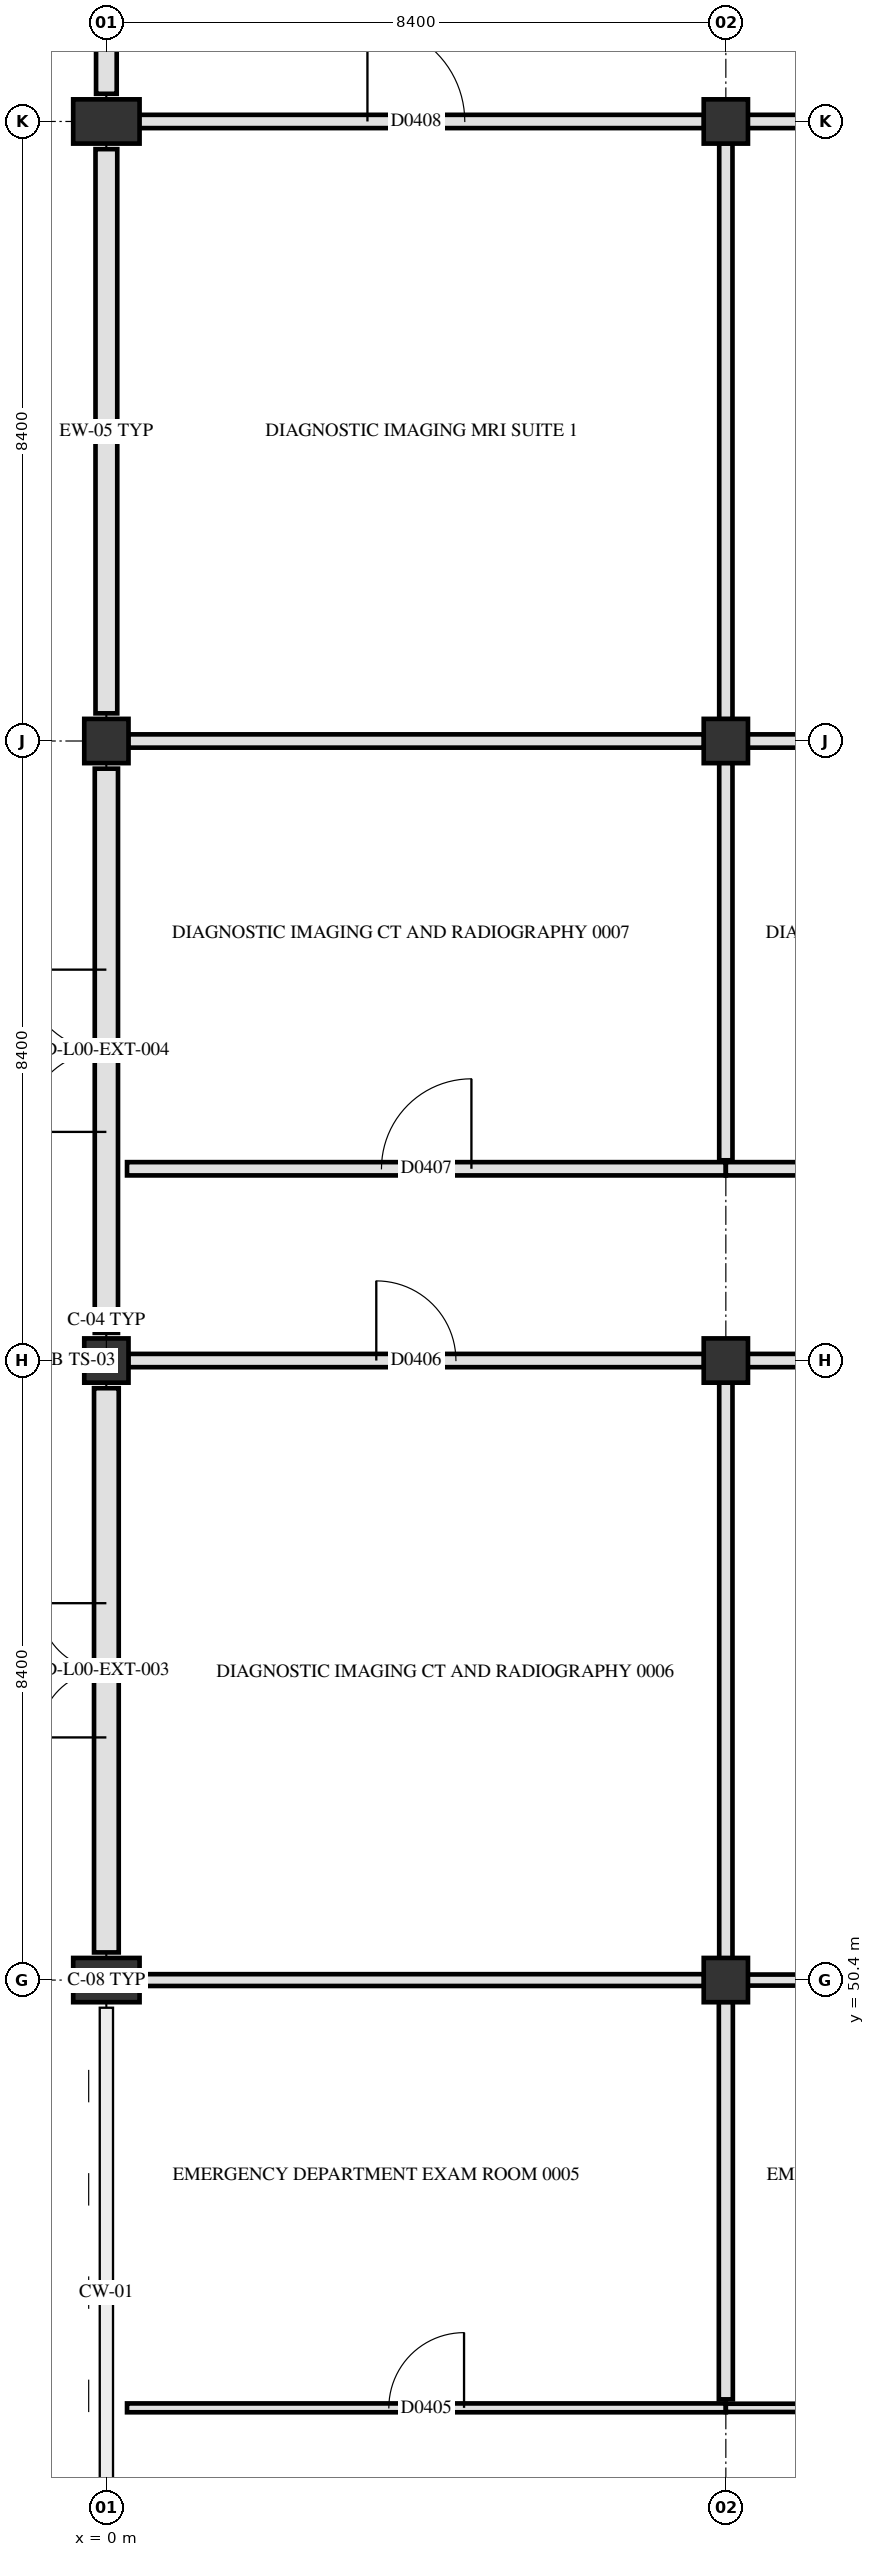
"""IFC4 building model, lengths in metres.
Left out: names, types, materials, properties, quantities, classifications, styles, units other than length and angle.
Written with IfcOpenShell. Run it as: python <this file> out.ifc"""

import sys

from ifc_helpers import new_model, si_unit, direction, frame, frame_2d, origin, origin_2d, place, context, subcontext, project, spatial, rectangle, extrude, element, fill, save


model = new_model("IFC4")
c1 = context("Model", 3, precision=1e-05, world=origin(), true_north=direction((0.0, 1.0)))
c2 = subcontext(c1, "Body", "Model", "MODEL_VIEW")
j1 = project(units=[si_unit("LENGTHUNIT", "METRE"), si_unit("PLANEANGLEUNIT", "RADIAN")], contexts=[c1])
p1 = place(None, origin())
s1 = spatial("IfcSite", under=j1, at=p1, CompositionType="ELEMENT")
p2 = place(p1, origin())
s2 = spatial("IfcBuilding", under=s1, at=p2, CompositionType="ELEMENT")
p3 = place(p2, origin())
s3 = spatial("IfcBuildingStorey", under=s2, at=p3, CompositionType="ELEMENT", Elevation=0.0)
p4 = place(p3, frame((0.0, 50.4, 0.0), z_axis=(0.0, 0.0, 1.0), x_axis=(0.0, 1.0, 0.0)))
e1 = element("IfcColumn", 1, at=p4, inside=s3, PredefinedType="PILASTER", context=c2, shape_type="SweptSolid", body=[
    extrude(rectangle(XDim=0.6, YDim=0.9, at=origin_2d()), origin(), (0.0, 0.0, 1.0), 4.8),
])
for number, where, z_axis, x_axis in (
    (2, (0.0, 58.8, 0.0), (0.0, 0.0, 1.0), (1.0, 0.0, 0.0)),
    (3, (0.0, 67.2, 0.0), (0.0, 0.0, 1.0), (1.0, 0.0, 0.0)),
):
    element("IfcColumn", number, at=place(p3, frame(where, z_axis=z_axis, x_axis=x_axis)), inside=s3, PredefinedType="COLUMN", context=c2, shape_type="SweptSolid", body=[
        extrude(rectangle(XDim=0.6, YDim=0.6, at=origin_2d()), origin(), (0.0, 0.0, 1.0), 4.8),
    ])
p5 = place(p3, frame((0.0, 75.6, 0.0), z_axis=(0.0, 0.0, 1.0), x_axis=(0.0, 1.0, 0.0)))
e4 = element("IfcColumn", 4, at=p5, inside=s3, PredefinedType="PILASTER", context=c2, shape_type="SweptSolid", body=[
    extrude(rectangle(XDim=0.6, YDim=0.9, at=origin_2d()), origin(), (0.0, 0.0, 1.0), 4.8),
])
for number, where, z_axis, x_axis in (
    (5, (8.4, 50.4, 0.0), (0.0, 0.0, 1.0), (1.0, 0.0, 0.0)),
    (6, (8.4, 58.8, 0.0), (0.0, 0.0, 1.0), (1.0, 0.0, 0.0)),
    (7, (8.4, 67.2, 0.0), (0.0, 0.0, 1.0), (1.0, 0.0, 0.0)),
    (8, (8.4, 75.6, 0.0), (0.0, 0.0, 1.0), (1.0, 0.0, 0.0)),
):
    element("IfcColumn", number, at=place(p3, frame(where, z_axis=z_axis, x_axis=x_axis)), inside=s3, PredefinedType="COLUMN", context=c2, shape_type="SweptSolid", body=[
        extrude(rectangle(XDim=0.6, YDim=0.6, at=origin_2d()), origin(), (0.0, 0.0, 1.0), 4.8),
    ])
p6 = place(p3, frame((0.0, 50.775, 0.0), z_axis=(0.0, 0.0, 1.0), x_axis=(0.0, 1.0, 0.0)))
e9 = element("IfcWall", 9, at=p6, inside=s3, PredefinedType="SOLIDWALL", context=c2, shape_type="SweptSolid", body=[
    extrude(rectangle(XDim=7.65, YDim=0.335, at=frame_2d((3.825, 0.0))), origin(), (0.0, 0.0, 1.0), 3.79),
])
p7 = place(p6, frame((2.915, 0.0, 0.0)))
e10 = element("IfcOpeningElement", 10, at=p7, cuts=e9, PredefinedType="OPENING", context=c2, shape_type="SweptSolid", body=[
    extrude(rectangle(XDim=1.82, YDim=2.28, at=frame_2d((0.91, 1.14))), frame((0.0, 0.177, 0.0), z_axis=(0.0, -1.0, 0.0), x_axis=(1.0, 0.0, 0.0)), (0.0, 0.0, 1.0), 0.355),
])
p8 = place(p3, frame((0.0, 59.175, 0.0), z_axis=(0.0, 0.0, 1.0), x_axis=(0.0, 1.0, 0.0)))
e11 = element("IfcWall", 11, at=p8, inside=s3, PredefinedType="SOLIDWALL", context=c2, shape_type="SweptSolid", body=[
    extrude(rectangle(XDim=7.65, YDim=0.315, at=frame_2d((3.825, 0.0))), origin(), (0.0, 0.0, 1.0), 3.79),
])
p9 = place(p8, frame((2.725, 0.0, 0.0)))
e12 = element("IfcOpeningElement", 12, at=p9, cuts=e11, PredefinedType="OPENING", context=c2, shape_type="SweptSolid", body=[
    extrude(rectangle(XDim=2.2, YDim=2.35, at=frame_2d((1.1, 1.175))), frame((0.0, 0.167, 0.0), z_axis=(0.0, -1.0, 0.0), x_axis=(1.0, 0.0, 0.0)), (0.0, 0.0, 1.0), 0.335),
])
p10 = place(p3, frame((0.0, 67.575, 0.0), z_axis=(0.0, 0.0, 1.0), x_axis=(0.0, 1.0, 0.0)))
e13 = element("IfcWall", 13, at=p10, inside=s3, PredefinedType="SOLIDWALL", context=c2, shape_type="SweptSolid", body=[
    extrude(rectangle(XDim=7.65, YDim=0.295, at=frame_2d((3.825, 0.0))), origin(), (0.0, 0.0, 1.0), 3.79),
])
p11 = place(p3, frame((0.0, 75.975, 0.0), z_axis=(0.0, 0.0, 1.0), x_axis=(0.0, 1.0, 0.0)))
e14 = element("IfcWall", 14, at=p11, inside=s3, PredefinedType="SOLIDWALL", context=c2, shape_type="SweptSolid", body=[
    extrude(rectangle(XDim=7.65, YDim=0.28, at=frame_2d((3.825, 0.0))), origin(), (0.0, 0.0, 1.0), 3.79),
])
p12 = place(p11, frame((1.438, 0.0, 0.85)))
e15 = element("IfcOpeningElement", 15, at=p12, cuts=e14, PredefinedType="OPENING", context=c2, shape_type="SweptSolid", body=[
    extrude(rectangle(XDim=0.95, YDim=1.3, at=frame_2d((0.475, 0.65))), frame((0.0, 0.15, 0.0), z_axis=(0.0, -1.0, 0.0), x_axis=(1.0, 0.0, 0.0)), (0.0, 0.0, 1.0), 0.3),
])
p13 = place(p11, frame((5.212, 0.0, 0.85)))
e16 = element("IfcOpeningElement", 16, at=p13, cuts=e14, PredefinedType="OPENING", context=c2, shape_type="SweptSolid", body=[
    extrude(rectangle(XDim=1.05, YDim=1.3, at=frame_2d((0.525, 0.65))), frame((0.0, 0.15, 0.0), z_axis=(0.0, -1.0, 0.0), x_axis=(1.0, 0.0, 0.0)), (0.0, 0.0, 1.0), 0.3),
])
p14 = place(p3, frame((0.28, 44.6, 0.0), z_axis=(0.0, 0.0, 1.0), x_axis=(1.0, 0.0, 0.0)))
e17 = element("IfcWall", 17, at=p14, inside=s3, PredefinedType="PARTITIONING", context=c2, shape_type="SweptSolid", body=[
    extrude(rectangle(XDim=8.12, YDim=0.12, at=frame_2d((4.06, 0.0))), origin(), (0.0, 0.0, 1.0), 3.89),
])
p15 = place(p14, frame((3.55, 0.0, 0.0)))
e18 = element("IfcOpeningElement", 18, at=p15, cuts=e17, PredefinedType="OPENING", context=c2, shape_type="SweptSolid", body=[
    extrude(rectangle(XDim=1.02, YDim=2.12, at=frame_2d((0.51, 1.06))), frame((0.0, 0.07, 0.0), z_axis=(0.0, -1.0, 0.0), x_axis=(1.0, 0.0, 0.0)), (0.0, 0.0, 1.0), 0.14),
])
p16 = place(p3, frame((8.4, 44.6, 0.0), z_axis=(0.0, 0.0, 1.0), x_axis=(1.0, 0.0, 0.0)))
e19 = element("IfcWall", 19, at=p16, inside=s3, PredefinedType="PARTITIONING", context=c2, shape_type="SweptSolid", body=[
    extrude(rectangle(XDim=8.4, YDim=0.112, at=frame_2d((4.2, 0.0))), origin(), (0.0, 0.0, 1.0), 3.89),
])
p17 = place(p16, frame((3.5, 0.0, 0.0)))
e20 = element("IfcOpeningElement", 20, at=p17, cuts=e19, PredefinedType="OPENING", context=c2, shape_type="SweptSolid", body=[
    extrude(rectangle(XDim=1.4, YDim=2.2, at=frame_2d((0.7, 1.1))), frame((0.0, 0.066, 0.0), z_axis=(0.0, -1.0, 0.0), x_axis=(1.0, 0.0, 0.0)), (0.0, 0.0, 1.0), 0.132),
])
p18 = place(p3, frame((0.295, 50.4, 0.0), z_axis=(0.0, 0.0, 1.0), x_axis=(1.0, 0.0, 0.0)))
e21 = element("IfcWall", 21, at=p18, inside=s3, PredefinedType="PARTITIONING", context=c2, shape_type="SweptSolid", body=[
    extrude(rectangle(XDim=7.81, YDim=0.16, at=frame_2d((3.905, 0.0))), origin(), (0.0, 0.0, 1.0), 3.84),
])
p19 = place(p3, frame((8.695, 50.4, 0.0), z_axis=(0.0, 0.0, 1.0), x_axis=(1.0, 0.0, 0.0)))
e22 = element("IfcWall", 22, at=p19, inside=s3, PredefinedType="PARTITIONING", context=c2, shape_type="SweptSolid", body=[
    extrude(rectangle(XDim=7.81, YDim=0.15, at=frame_2d((3.905, 0.0))), origin(), (0.0, 0.0, 1.0), 3.84),
])
p20 = place(p3, frame((0.295, 58.8, 0.0), z_axis=(0.0, 0.0, 1.0), x_axis=(1.0, 0.0, 0.0)))
e23 = element("IfcWall", 23, at=p20, inside=s3, PredefinedType="PARTITIONING", context=c2, shape_type="SweptSolid", body=[
    extrude(rectangle(XDim=7.81, YDim=0.18, at=frame_2d((3.905, 0.0))), origin(), (0.0, 0.0, 1.0), 3.84),
])
p21 = place(p20, frame((3.365, 0.0, 0.0)))
e24 = element("IfcOpeningElement", 24, at=p21, cuts=e23, PredefinedType="OPENING", context=c2, shape_type="SweptSolid", body=[
    extrude(rectangle(XDim=1.08, YDim=2.12, at=frame_2d((0.54, 1.06))), frame((0.0, 0.1, 0.0), z_axis=(0.0, -1.0, 0.0), x_axis=(1.0, 0.0, 0.0)), (0.0, 0.0, 1.0), 0.2),
])
p22 = place(p3, frame((8.695, 58.8, 0.0), z_axis=(0.0, 0.0, 1.0), x_axis=(1.0, 0.0, 0.0)))
e25 = element("IfcWall", 25, at=p22, inside=s3, PredefinedType="PARTITIONING", context=c2, shape_type="SweptSolid", body=[
    extrude(rectangle(XDim=5.655, YDim=0.18, at=frame_2d((2.828, 0.0))), origin(), (0.0, 0.0, 1.0), 3.84),
])
p23 = place(p22, frame((2.153, 0.0, 0.0)))
e26 = element("IfcOpeningElement", 26, at=p23, cuts=e25, PredefinedType="OPENING", context=c2, shape_type="SweptSolid", body=[
    extrude(rectangle(XDim=1.35, YDim=2.2, at=frame_2d((0.675, 1.1))), frame((0.0, 0.1, 0.0), z_axis=(0.0, -1.0, 0.0), x_axis=(1.0, 0.0, 0.0)), (0.0, 0.0, 1.0), 0.2),
])
p24 = place(p3, frame((0.28, 61.4, 0.0), z_axis=(0.0, 0.0, 1.0), x_axis=(1.0, 0.0, 0.0)))
e27 = element("IfcWall", 27, at=p24, inside=s3, PredefinedType="PARTITIONING", context=c2, shape_type="SweptSolid", body=[
    extrude(rectangle(XDim=8.12, YDim=0.18, at=frame_2d((4.06, 0.0))), origin(), (0.0, 0.0, 1.0), 3.89),
])
p25 = place(p24, frame((3.45, 0.0, 0.0)))
e28 = element("IfcOpeningElement", 28, at=p25, cuts=e27, PredefinedType="OPENING", context=c2, shape_type="SweptSolid", body=[
    extrude(rectangle(XDim=1.22, YDim=2.18, at=frame_2d((0.61, 1.09))), frame((0.0, 0.1, 0.0), z_axis=(0.0, -1.0, 0.0), x_axis=(1.0, 0.0, 0.0)), (0.0, 0.0, 1.0), 0.2),
])
p26 = place(p3, frame((8.4, 61.4, 0.0), z_axis=(0.0, 0.0, 1.0), x_axis=(1.0, 0.0, 0.0)))
e29 = element("IfcWall", 29, at=p26, inside=s3, PredefinedType="PARTITIONING", context=c2, shape_type="SweptSolid", body=[
    extrude(rectangle(XDim=8.4, YDim=0.18, at=frame_2d((4.2, 0.0))), origin(), (0.0, 0.0, 1.0), 3.89),
])
p27 = place(p26, frame((3.475, 0.0, 0.0)))
e30 = element("IfcOpeningElement", 30, at=p27, cuts=e29, PredefinedType="OPENING", context=c2, shape_type="SweptSolid", body=[
    extrude(rectangle(XDim=1.45, YDim=2.2, at=frame_2d((0.725, 1.1))), frame((0.0, 0.1, 0.0), z_axis=(0.0, -1.0, 0.0), x_axis=(1.0, 0.0, 0.0)), (0.0, 0.0, 1.0), 0.2),
])
p28 = place(p3, frame((0.295, 67.2, 0.0), z_axis=(0.0, 0.0, 1.0), x_axis=(1.0, 0.0, 0.0)))
e31 = element("IfcWall", 31, at=p28, inside=s3, PredefinedType="PARTITIONING", context=c2, shape_type="SweptSolid", body=[
    extrude(rectangle(XDim=7.81, YDim=0.18, at=frame_2d((3.905, 0.0))), origin(), (0.0, 0.0, 1.0), 3.84),
])
p29 = place(p3, frame((8.695, 67.2, 0.0), z_axis=(0.0, 0.0, 1.0), x_axis=(1.0, 0.0, 0.0)))
e32 = element("IfcWall", 32, at=p29, inside=s3, PredefinedType="PARTITIONING", context=c2, shape_type="SweptSolid", body=[
    extrude(rectangle(XDim=7.81, YDim=0.18, at=frame_2d((3.905, 0.0))), origin(), (0.0, 0.0, 1.0), 3.84),
])
p30 = place(p3, frame((0.295, 75.6, 0.0), z_axis=(0.0, 0.0, 1.0), x_axis=(1.0, 0.0, 0.0)))
e33 = element("IfcWall", 33, at=p30, inside=s3, PredefinedType="PARTITIONING", context=c2, shape_type="SweptSolid", body=[
    extrude(rectangle(XDim=7.81, YDim=0.18, at=frame_2d((3.905, 0.0))), origin(), (0.0, 0.0, 1.0), 3.84),
])
p31 = place(p30, frame((3.245, 0.0, 0.0)))
e34 = element("IfcOpeningElement", 34, at=p31, cuts=e33, PredefinedType="OPENING", context=c2, shape_type="SweptSolid", body=[
    extrude(rectangle(XDim=1.32, YDim=2.18, at=frame_2d((0.66, 1.09))), frame((0.0, 0.1, 0.0), z_axis=(0.0, -1.0, 0.0), x_axis=(1.0, 0.0, 0.0)), (0.0, 0.0, 1.0), 0.2),
])
p32 = place(p3, frame((8.695, 75.6, 0.0), z_axis=(0.0, 0.0, 1.0), x_axis=(1.0, 0.0, 0.0)))
e35 = element("IfcWall", 35, at=p32, inside=s3, PredefinedType="PARTITIONING", context=c2, shape_type="SweptSolid", body=[
    extrude(rectangle(XDim=7.71, YDim=0.18, at=frame_2d((3.855, 0.0))), origin(), (0.0, 0.0, 1.0), 3.84),
])
p33 = place(p32, frame((3.055, 0.0, 0.0)))
e36 = element("IfcOpeningElement", 36, at=p33, cuts=e35, PredefinedType="OPENING", context=c2, shape_type="SweptSolid", body=[
    extrude(rectangle(XDim=1.6, YDim=2.25, at=frame_2d((0.8, 1.125))), frame((0.0, 0.1, 0.0), z_axis=(0.0, -1.0, 0.0), x_axis=(1.0, 0.0, 0.0)), (0.0, 0.0, 1.0), 0.2),
])
p34 = place(p3, frame((8.4, 44.715, 0.0), z_axis=(0.0, 0.0, 1.0), x_axis=(0.0, 1.0, 0.0)))
e37 = element("IfcWall", 37, at=p34, inside=s3, PredefinedType="PARTITIONING", context=c2, shape_type="SweptSolid", body=[
    extrude(rectangle(XDim=5.39, YDim=0.19, at=frame_2d((2.695, 0.0))), origin(), (0.0, 0.0, 1.0), 3.89),
])
p35 = place(p3, frame((8.4, 50.695, 0.0), z_axis=(0.0, 0.0, 1.0), x_axis=(0.0, 1.0, 0.0)))
e38 = element("IfcWall", 38, at=p35, inside=s3, PredefinedType="PARTITIONING", context=c2, shape_type="SweptSolid", body=[
    extrude(rectangle(XDim=7.81, YDim=0.18, at=frame_2d((3.905, 0.0))), origin(), (0.0, 0.0, 1.0), 3.89),
])
p36 = place(p3, frame((8.4, 61.515, 0.0), z_axis=(0.0, 0.0, 1.0), x_axis=(0.0, 1.0, 0.0)))
e39 = element("IfcWall", 39, at=p36, inside=s3, PredefinedType="PARTITIONING", context=c2, shape_type="SweptSolid", body=[
    extrude(rectangle(XDim=5.39, YDim=0.18, at=frame_2d((2.695, 0.0))), origin(), (0.0, 0.0, 1.0), 3.89),
])
p37 = place(p3, frame((8.4, 67.495, 0.0), z_axis=(0.0, 0.0, 1.0), x_axis=(0.0, 1.0, 0.0)))
e40 = element("IfcWall", 40, at=p37, inside=s3, PredefinedType="PARTITIONING", context=c2, shape_type="SweptSolid", body=[
    extrude(rectangle(XDim=7.81, YDim=0.18, at=frame_2d((3.905, 0.0))), origin(), (0.0, 0.0, 1.0), 3.89),
])
p38 = place(p7, origin())
e41 = element("IfcDoor", 41, at=p38, inside=s3, OperationType="DOUBLE_SWING_LEFT", PredefinedType="DOOR", context=c2, shape_type="SweptSolid", body=[
    extrude(rectangle(XDim=1.82, YDim=2.28, at=frame_2d((0.91, 1.14))), frame((0.0, 0.025, 0.0), z_axis=(0.0, -1.0, 0.0), x_axis=(1.0, 0.0, 0.0)), (0.0, 0.0, 1.0), 0.05),
])
fill(e10, e41)
p39 = place(p9, origin())
e42 = element("IfcDoor", 42, at=p39, inside=s3, OperationType="DOUBLE_SWING_LEFT", PredefinedType="DOOR", context=c2, shape_type="SweptSolid", body=[
    extrude(rectangle(XDim=2.2, YDim=2.35, at=frame_2d((1.1, 1.175))), frame((0.0, 0.025, 0.0), z_axis=(0.0, -1.0, 0.0), x_axis=(1.0, 0.0, 0.0)), (0.0, 0.0, 1.0), 0.05),
])
fill(e12, e42)
p40 = place(p15, origin())
e43 = element("IfcDoor", 43, at=p40, inside=s3, OperationType="SINGLE_SWING_RIGHT", PredefinedType="DOOR", context=c2, shape_type="SweptSolid", body=[
    extrude(rectangle(XDim=1.02, YDim=2.12, at=frame_2d((0.51, 1.06))), frame((0.0, 0.025, 0.0), z_axis=(0.0, -1.0, 0.0), x_axis=(1.0, 0.0, 0.0)), (0.0, 0.0, 1.0), 0.05),
])
fill(e18, e43)
p41 = place(p21, origin())
e44 = element("IfcDoor", 44, at=p41, inside=s3, OperationType="SINGLE_SWING_LEFT", PredefinedType="DOOR", context=c2, shape_type="SweptSolid", body=[
    extrude(rectangle(XDim=1.08, YDim=2.12, at=frame_2d((0.54, 1.06))), frame((0.0, 0.025, 0.0), z_axis=(0.0, -1.0, 0.0), x_axis=(1.0, 0.0, 0.0)), (0.0, 0.0, 1.0), 0.05),
])
fill(e24, e44)
p42 = place(p25, origin())
e45 = element("IfcDoor", 45, at=p42, inside=s3, OperationType="SINGLE_SWING_RIGHT", PredefinedType="DOOR", context=c2, shape_type="SweptSolid", body=[
    extrude(rectangle(XDim=1.22, YDim=2.18, at=frame_2d((0.61, 1.09))), frame((0.0, 0.025, 0.0), z_axis=(0.0, -1.0, 0.0), x_axis=(1.0, 0.0, 0.0)), (0.0, 0.0, 1.0), 0.05),
])
fill(e28, e45)
p43 = place(p31, origin())
e46 = element("IfcDoor", 46, at=p43, inside=s3, OperationType="SINGLE_SWING_LEFT", PredefinedType="DOOR", context=c2, shape_type="SweptSolid", body=[
    extrude(rectangle(XDim=1.32, YDim=2.18, at=frame_2d((0.66, 1.09))), frame((0.0, 0.025, 0.0), z_axis=(0.0, -1.0, 0.0), x_axis=(1.0, 0.0, 0.0)), (0.0, 0.0, 1.0), 0.05),
])
fill(e34, e46)
save(model, sys.argv[1])
